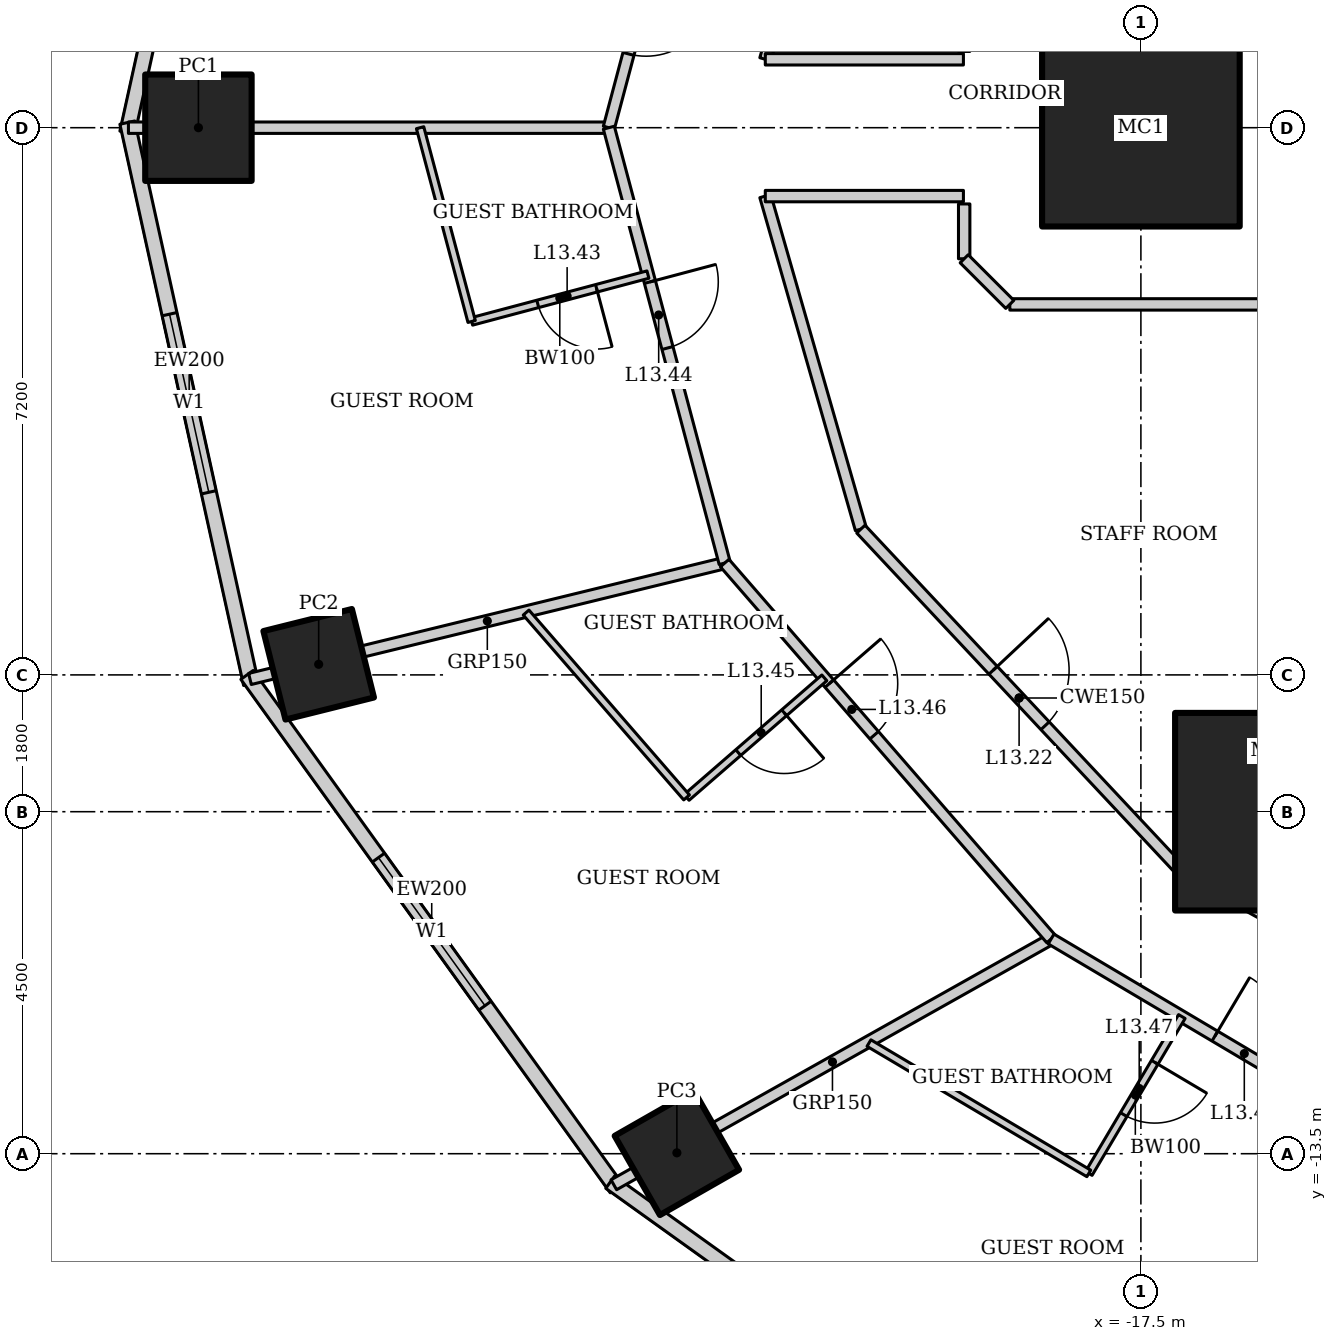
"""IFC4 building model, lengths in metres.
Left out: names, types, materials, properties, quantities, classifications, styles, units other than length and angle.
Written with IfcOpenShell. Run it as: python <this file> out.ifc"""

import sys

from ifc_helpers import new_model, si_unit, direction, frame, frame_2d, origin, origin_2d, place, context, subcontext, project, spatial, rectangle, hollow_rectangle, extrude, element, fill, save


model = new_model("IFC4")
c1 = context("Model", 3, precision=1e-05, world=origin(), true_north=direction((0.0, 1.0)))
c2 = subcontext(c1, "Body", "Model", "MODEL_VIEW")
j1 = project(units=[si_unit("LENGTHUNIT", "METRE"), si_unit("PLANEANGLEUNIT", "RADIAN")], contexts=[c1])
p1 = place(None, origin())
s1 = spatial("IfcSite", under=j1, at=p1, CompositionType="ELEMENT")
p2 = place(p1, origin())
s2 = spatial("IfcBuilding", under=s1, at=p2, CompositionType="ELEMENT")
p3 = place(p2, frame((0.0, 0.0, 62.2)))
s3 = spatial("IfcBuildingStorey", under=s2, at=p3, CompositionType="ELEMENT", Elevation=62.2)
for number, where, z_axis, x_axis in (
    (1, (-17.5, 0.0, 0.0), (0.0, 0.0, 1.0), (1.0, 0.0, 0.0)),
    (2, (-15.75, -9.0, 0.0), (0.0, 0.0, 1.0), (1.0, 0.0, 0.0)),
):
    element("IfcColumn", number, at=place(p3, frame(where, z_axis=z_axis, x_axis=x_axis)), inside=s3, PredefinedType="COLUMN", context=c2, shape_type="SweptSolid", body=[
        extrude(hollow_rectangle(XDim=2.6, YDim=2.6, WallThickness=0.13, at=origin_2d()), origin(), (0.0, 0.0, 1.0), 3.6),
    ])
p4 = place(p3, frame((-29.9, 0.0, 0.0), z_axis=(0.0, 0.0, 1.0), x_axis=(1.0, 0.0, 0.0)))
e3 = element("IfcColumn", 3, at=p4, inside=s3, PredefinedType="COLUMN", context=c2, shape_type="SweptSolid", body=[
    extrude(hollow_rectangle(XDim=1.4, YDim=1.4, WallThickness=0.1, at=origin_2d()), origin(), (0.0, 0.0, 1.0), 3.6),
])
p5 = place(p3, frame((-28.318, -7.06, 0.0), z_axis=(0.0, 0.0, 1.0), x_axis=(0.970295726276, 0.2419218956, 0.0)))
e4 = element("IfcColumn", 4, at=p5, inside=s3, PredefinedType="COLUMN", context=c2, shape_type="SweptSolid", body=[
    extrude(hollow_rectangle(XDim=1.2, YDim=1.2, WallThickness=0.1, at=origin_2d()), origin(), (0.0, 0.0, 1.0), 3.6),
])
p6 = place(p3, frame((-23.605, -13.489, 0.0), z_axis=(0.0, 0.0, 1.0), x_axis=(0.86824298017, 0.496139221777, 0.0)))
e5 = element("IfcColumn", 5, at=p6, inside=s3, PredefinedType="COLUMN", context=c2, shape_type="SweptSolid", body=[
    extrude(hollow_rectangle(XDim=1.2, YDim=1.2, WallThickness=0.12, at=origin_2d()), origin(), (0.0, 0.0, 1.0), 3.6),
])
p7 = place(p3, frame((-29.208, 7.318, 0.0), z_axis=(0.0, 0.0, 1.0), x_axis=(-0.215238065514, -0.976561608478, 0.0)))
e6 = element("IfcWall", 6, at=p7, inside=s3, PredefinedType="SOLIDWALL", context=c2, shape_type="SweptSolid", body=[
    extrude(rectangle(XDim=7.562, YDim=0.2, at=frame_2d((3.781, 0.0))), origin(), (0.0, 0.0, 1.0), 3.45),
])
p8 = place(p7, frame((2.581, 0.0, 0.5)))
e7 = element("IfcOpeningElement", 7, at=p8, cuts=e6, PredefinedType="OPENING", context=c2, shape_type="SweptSolid", body=[
    extrude(rectangle(XDim=2.4, YDim=2.2, at=frame_2d((1.2, 1.1))), frame((0.0, 0.11, 0.0), z_axis=(0.0, -1.0, 0.0), x_axis=(1.0, 0.0, 0.0)), (0.0, 0.0, 1.0), 0.22),
])
p9 = place(p3, frame((-30.835, 0.067, 0.0), z_axis=(0.0, 0.0, 1.0), x_axis=(0.215238065514, -0.976561608478, 0.0)))
e8 = element("IfcWall", 8, at=p9, inside=s3, PredefinedType="SOLIDWALL", context=c2, shape_type="SweptSolid", body=[
    extrude(rectangle(XDim=7.562, YDim=0.2, at=frame_2d((3.781, 0.0))), origin(), (0.0, 0.0, 1.0), 3.45),
])
p10 = place(p9, frame((2.581, 0.0, 0.5)))
e9 = element("IfcOpeningElement", 9, at=p10, cuts=e8, PredefinedType="OPENING", context=c2, shape_type="SweptSolid", body=[
    extrude(rectangle(XDim=2.4, YDim=2.2, at=frame_2d((1.2, 1.1))), frame((0.0, 0.11, 0.0), z_axis=(0.0, -1.0, 0.0), x_axis=(1.0, 0.0, 0.0)), (0.0, 0.0, 1.0), 0.22),
])
p11 = place(p3, frame((-29.26, -7.2, 0.0), z_axis=(0.0, 0.0, 1.0), x_axis=(0.583937613703, -0.811798536155, 0.0)))
e10 = element("IfcWall", 10, at=p11, inside=s3, PredefinedType="SOLIDWALL", context=c2, shape_type="SweptSolid", body=[
    extrude(rectangle(XDim=8.323, YDim=0.2, at=frame_2d((4.162, 0.0))), origin(), (0.0, 0.0, 1.0), 3.45),
])
p12 = place(p11, frame((2.961, 0.0, 0.5)))
e11 = element("IfcOpeningElement", 11, at=p12, cuts=e10, PredefinedType="OPENING", context=c2, shape_type="SweptSolid", body=[
    extrude(rectangle(XDim=2.4, YDim=2.2, at=frame_2d((1.2, 1.1))), frame((0.0, 0.11, 0.0), z_axis=(0.0, -1.0, 0.0), x_axis=(1.0, 0.0, 0.0)), (0.0, 0.0, 1.0), 0.22),
])
p13 = place(p3, frame((-24.482, -13.875, 0.0), z_axis=(0.0, 0.0, 1.0), x_axis=(0.812791321576, -0.582554948112, 0.0)))
e12 = element("IfcWall", 12, at=p13, inside=s3, PredefinedType="SOLIDWALL", context=c2, shape_type="SweptSolid", body=[
    extrude(rectangle(XDim=8.063, YDim=0.2, at=frame_2d((4.032, 0.0))), origin(), (0.0, 0.0, 1.0), 3.45),
])
p14 = place(p13, frame((2.832, 0.0, 0.5)))
e13 = element("IfcOpeningElement", 13, at=p14, cuts=e12, PredefinedType="OPENING", context=c2, shape_type="SweptSolid", body=[
    extrude(rectangle(XDim=2.4, YDim=2.2, at=frame_2d((1.2, 1.1))), frame((0.0, 0.11, 0.0), z_axis=(0.0, -1.0, 0.0), x_axis=(1.0, 0.0, 0.0)), (0.0, 0.0, 1.0), 0.22),
])
p15 = place(p3, frame((-30.821, 0.0, 0.0), z_axis=(0.0, 0.0, 1.0), x_axis=(1.0, 0.0, 0.0)))
e14 = element("IfcWall", 14, at=p15, inside=s3, PredefinedType="PARTITIONING", context=c2, shape_type="SweptSolid", body=[
    extrude(rectangle(XDim=6.321, YDim=0.15, at=frame_2d((3.16, 0.0))), origin(), (0.0, 0.0, 1.0), 2.528),
])
p16 = place(p3, frame((-29.222, -7.254, 0.0), z_axis=(0.0, 0.0, 1.0), x_axis=(0.971456980633, 0.237215797913, 0.0)))
e15 = element("IfcWall", 15, at=p16, inside=s3, PredefinedType="PARTITIONING", context=c2, shape_type="SweptSolid", body=[
    extrude(rectangle(XDim=6.429, YDim=0.15, at=frame_2d((3.215, 0.0))), origin(), (0.0, 0.0, 1.0), 2.333),
])
p17 = place(p3, frame((-24.435, -13.909, 0.0), z_axis=(0.0, 0.0, 1.0), x_axis=(0.871747379892, 0.489955616001, 0.0)))
e16 = element("IfcWall", 16, at=p17, inside=s3, PredefinedType="PARTITIONING", context=c2, shape_type="SweptSolid", body=[
    extrude(rectangle(XDim=6.6, YDim=0.15, at=frame_2d((3.3, 0.0))), origin(), (0.0, 0.0, 1.0), 2.693),
])
p18 = place(p3, frame((-17.97, -18.542, 0.0), z_axis=(0.0, 0.0, 1.0), x_axis=(0.699736251994, 0.714401272147, 0.0)))
e17 = element("IfcWall", 17, at=p18, inside=s3, PredefinedType="PARTITIONING", context=c2, shape_type="SweptSolid", body=[
    extrude(rectangle(XDim=6.593, YDim=0.15, at=frame_2d((3.296, 0.0))), origin(), (0.0, 0.0, 1.0), 2.528),
])
p19 = place(p3, frame((-22.976, 5.729, 0.0), z_axis=(0.0, 0.0, 1.0), x_axis=(-0.257083265334, -0.966389256296, 0.0)))
e18 = element("IfcWall", 18, at=p19, inside=s3, PredefinedType="PARTITIONING", context=c2, shape_type="SweptSolid", body=[
    extrude(rectangle(XDim=5.928, YDim=0.15, at=frame_2d((2.964, 0.0))), origin(), (0.0, 0.0, 1.0), 3.45),
])
p20 = place(p19, frame((4.023, 0.0, 0.0)))
e19 = element("IfcOpeningElement", 19, at=p20, cuts=e18, PredefinedType="OPENING", context=c2, shape_type="SweptSolid", body=[
    extrude(rectangle(XDim=0.9, YDim=2.1, at=frame_2d((0.45, 1.05))), frame((0.0, 0.085, 0.0), z_axis=(0.0, -1.0, 0.0), x_axis=(1.0, 0.0, 0.0)), (0.0, 0.0, 1.0), 0.17),
])
p21 = place(p3, frame((-24.5, 0.0, 0.0), z_axis=(0.0, 0.0, 1.0), x_axis=(0.257083265334, -0.966389256296, 0.0)))
e20 = element("IfcWall", 20, at=p21, inside=s3, PredefinedType="PARTITIONING", context=c2, shape_type="SweptSolid", body=[
    extrude(rectangle(XDim=5.928, YDim=0.15, at=frame_2d((2.964, 0.0))), origin(), (0.0, 0.0, 1.0), 3.45),
])
p22 = place(p21, frame((2.1, 0.0, 0.0)))
e21 = element("IfcOpeningElement", 21, at=p22, cuts=e20, PredefinedType="OPENING", context=c2, shape_type="SweptSolid", body=[
    extrude(rectangle(XDim=0.9, YDim=2.1, at=frame_2d((0.45, 1.05))), frame((0.0, 0.085, 0.0), z_axis=(0.0, -1.0, 0.0), x_axis=(1.0, 0.0, 0.0)), (0.0, 0.0, 1.0), 0.17),
])
p23 = place(p3, frame((-22.976, -5.729, 0.0), z_axis=(0.0, 0.0, 1.0), x_axis=(0.655599989166, -0.755108372491, 0.0)))
e22 = element("IfcWall", 22, at=p23, inside=s3, PredefinedType="PARTITIONING", context=c2, shape_type="SweptSolid", body=[
    extrude(rectangle(XDim=6.551, YDim=0.15, at=frame_2d((3.275, 0.0))), origin(), (0.0, 0.0, 1.0), 3.45),
])
p24 = place(p23, frame((2.1, 0.0, 0.0)))
e23 = element("IfcOpeningElement", 23, at=p24, cuts=e22, PredefinedType="OPENING", context=c2, shape_type="SweptSolid", body=[
    extrude(rectangle(XDim=0.9, YDim=2.1, at=frame_2d((0.45, 1.05))), frame((0.0, 0.085, 0.0), z_axis=(0.0, -1.0, 0.0), x_axis=(1.0, 0.0, 0.0)), (0.0, 0.0, 1.0), 0.17),
])
p25 = place(p3, frame((-18.681, -10.675, 0.0), z_axis=(0.0, 0.0, 1.0), x_axis=(0.860147339762, -0.510045639036, 0.0)))
e24 = element("IfcWall", 24, at=p25, inside=s3, PredefinedType="PARTITIONING", context=c2, shape_type="SweptSolid", body=[
    extrude(rectangle(XDim=6.19, YDim=0.15, at=frame_2d((3.095, 0.0))), origin(), (0.0, 0.0, 1.0), 3.45),
])
p26 = place(p25, frame((2.505, 0.0, 0.0)))
e25 = element("IfcOpeningElement", 25, at=p26, cuts=e24, PredefinedType="OPENING", context=c2, shape_type="SweptSolid", body=[
    extrude(rectangle(XDim=0.9, YDim=2.1, at=frame_2d((0.45, 1.05))), frame((0.0, 0.085, 0.0), z_axis=(0.0, -1.0, 0.0), x_axis=(1.0, 0.0, 0.0)), (0.0, 0.0, 1.0), 0.17),
])
for number, where, z_axis, x_axis in (
    (26, (-21.184, 5.282, 0.0), (0.0, 0.0, 1.0), (-0.276, -0.961, 0.0)),
    (27, (-22.442, -0.9, 0.0), (0.0, 0.0, 1.0), (0.276, -0.961, 0.0)),
):
    element("IfcWall", number, at=place(p3, frame(where, z_axis=z_axis, x_axis=x_axis)), inside=s3, PredefinedType="PARTITIONING", context=c2, shape_type="SweptSolid", body=[
        extrude(rectangle(XDim=4.559, YDim=0.15, at=frame_2d((2.279, 0.0))), origin(), (0.0, 0.0, 1.0), 3.45),
    ])
p27 = place(p3, frame((-21.184, -5.282, 0.0), z_axis=(0.0, 0.0, 1.0), x_axis=(0.68365836236, -0.729802194828, 0.0)))
e28 = element("IfcWall", 28, at=p27, inside=s3, PredefinedType="PARTITIONING", context=c2, shape_type="SweptSolid", body=[
    extrude(rectangle(XDim=6.09, YDim=0.15, at=frame_2d((3.045, 0.0))), origin(), (0.0, 0.0, 1.0), 3.45),
])
p28 = place(p27, frame((2.545, 0.0, 0.0)))
e29 = element("IfcOpeningElement", 29, at=p28, cuts=e28, PredefinedType="OPENING", context=c2, shape_type="SweptSolid", body=[
    extrude(rectangle(XDim=1.0, YDim=2.1, at=frame_2d((0.5, 1.05))), frame((0.0, 0.085, 0.0), z_axis=(0.0, -1.0, 0.0), x_axis=(1.0, 0.0, 0.0)), (0.0, 0.0, 1.0), 0.17),
])
p29 = place(p3, frame((-17.021, -9.726, 0.0), z_axis=(0.0, 0.0, 1.0), x_axis=(0.876522084062, -0.481361647986, 0.0)))
e30 = element("IfcWall", 30, at=p29, inside=s3, PredefinedType="PARTITIONING", context=c2, shape_type="SweptSolid", body=[
    extrude(rectangle(XDim=5.687, YDim=0.15, at=frame_2d((2.844, 0.0))), origin(), (0.0, 0.0, 1.0), 3.45),
])
p30 = place(p3, frame((-23.986, -1.933, 0.0), z_axis=(0.0, 0.0, 1.0), x_axis=(-0.96639514992, -0.257061109879, 0.0)))
e31 = element("IfcWall", 31, at=p30, inside=s3, PredefinedType="PARTITIONING", context=c2, shape_type="SweptSolid", body=[
    extrude(rectangle(XDim=2.4, YDim=0.1, at=frame_2d((1.2, 0.0))), origin(), (0.0, 0.0, 1.0), 3.45),
])
p31 = place(p30, frame((0.7, 0.0, 0.0)))
e32 = element("IfcOpeningElement", 32, at=p31, cuts=e31, PredefinedType="OPENING", context=c2, shape_type="SweptSolid", body=[
    extrude(rectangle(XDim=0.8, YDim=2.1, at=frame_2d((0.4, 1.05))), frame((0.0, 0.06, 0.0), z_axis=(0.0, -1.0, 0.0), x_axis=(1.0, 0.0, 0.0)), (0.0, 0.0, 1.0), 0.12),
])
p32 = place(p3, frame((-26.305, -2.55, 0.0), z_axis=(0.0, 0.0, 1.0), x_axis=(-0.257052122515, 0.966397540513, 0.0)))
e33 = element("IfcWall", 33, at=p32, inside=s3, PredefinedType="PARTITIONING", context=c2, shape_type="SweptSolid", body=[
    extrude(rectangle(XDim=2.638, YDim=0.1, at=frame_2d((1.319, 0.0))), origin(), (0.0, 0.0, 1.0), 3.45),
])
p33 = place(p3, frame((-21.665, -7.239, 0.0), z_axis=(0.0, 0.0, 1.0), x_axis=(-0.755098052661, -0.655611875172, 0.0)))
e34 = element("IfcWall", 34, at=p33, inside=s3, PredefinedType="PARTITIONING", context=c2, shape_type="SweptSolid", body=[
    extrude(rectangle(XDim=2.4, YDim=0.1, at=frame_2d((1.2, 0.0))), origin(), (0.0, 0.0, 1.0), 3.45),
])
p34 = place(p33, frame((0.7, 0.0, 0.0)))
e35 = element("IfcOpeningElement", 35, at=p34, cuts=e34, PredefinedType="OPENING", context=c2, shape_type="SweptSolid", body=[
    extrude(rectangle(XDim=0.8, YDim=2.1, at=frame_2d((0.4, 1.05))), frame((0.0, 0.06, 0.0), z_axis=(0.0, -1.0, 0.0), x_axis=(1.0, 0.0, 0.0)), (0.0, 0.0, 1.0), 0.12),
])
p35 = place(p3, frame((-23.477, -8.812, 0.0), z_axis=(0.0, 0.0, 1.0), x_axis=(-0.655596826012, 0.755111118792, 0.0)))
e36 = element("IfcWall", 36, at=p35, inside=s3, PredefinedType="PARTITIONING", context=c2, shape_type="SweptSolid", body=[
    extrude(rectangle(XDim=3.221, YDim=0.1, at=frame_2d((1.611, 0.0))), origin(), (0.0, 0.0, 1.0), 3.45),
])
p36 = place(p3, frame((-16.961, -11.695, 0.0), z_axis=(0.0, 0.0, 1.0), x_axis=(-0.510075642074, -0.860129548012, 0.0)))
e37 = element("IfcWall", 37, at=p36, inside=s3, PredefinedType="PARTITIONING", context=c2, shape_type="SweptSolid", body=[
    extrude(rectangle(XDim=2.4, YDim=0.1, at=frame_2d((1.2, 0.0))), origin(), (0.0, 0.0, 1.0), 3.45),
])
p37 = place(p36, frame((0.7, 0.0, 0.0)))
e38 = element("IfcOpeningElement", 38, at=p37, cuts=e37, PredefinedType="OPENING", context=c2, shape_type="SweptSolid", body=[
    extrude(rectangle(XDim=0.8, YDim=2.1, at=frame_2d((0.4, 1.05))), frame((0.0, 0.06, 0.0), z_axis=(0.0, -1.0, 0.0), x_axis=(1.0, 0.0, 0.0)), (0.0, 0.0, 1.0), 0.12),
])
p38 = place(p3, frame((-18.185, -13.76, 0.0), z_axis=(0.0, 0.0, 1.0), x_axis=(-0.860146437071, 0.510047161343, 0.0)))
e39 = element("IfcWall", 39, at=p38, inside=s3, PredefinedType="PARTITIONING", context=c2, shape_type="SweptSolid", body=[
    extrude(rectangle(XDim=3.363, YDim=0.1, at=frame_2d((1.681, 0.0))), origin(), (0.0, 0.0, 1.0), 3.45),
])
for number, where, z_axis, x_axis in (
    (40, (-19.835, -0.9, 0.0), (0.0, 0.0, 1.0), (-1.0, 0.0, 0.0)),
    (41, (-19.835, 0.9, 0.0), (0.0, 0.0, 1.0), (-1.0, 0.0, 0.0)),
):
    element("IfcWall", number, at=place(p3, frame(where, z_axis=z_axis, x_axis=x_axis)), inside=s3, PredefinedType="PARTITIONING", context=c2, shape_type="SweptSolid", body=[
        extrude(rectangle(XDim=2.607, YDim=0.15, at=frame_2d((1.303, 0.0))), origin(), (0.0, 0.0, 1.0), 3.45),
    ])
p39 = place(p3, frame((-19.825, -1.725, 0.0), z_axis=(0.0, 0.0, 1.0), x_axis=(0.0, 1.0, 0.0)))
e42 = element("IfcWall", 42, at=p39, inside=s3, PredefinedType="PARTITIONING", context=c2, shape_type="SweptSolid", body=[
    extrude(rectangle(XDim=0.721, YDim=0.15, at=frame_2d((0.361, 0.0))), origin(), (0.0, 0.0, 1.0), 3.45),
])
p40 = place(p3, frame((-15.775, -2.325, 0.0), z_axis=(0.0, 0.0, 1.0), x_axis=(-1.0, 0.0, 0.0)))
e43 = element("IfcWall", 43, at=p40, inside=s3, PredefinedType="PARTITIONING", context=c2, shape_type="SweptSolid", body=[
    extrude(rectangle(XDim=3.449, YDim=0.15, at=frame_2d((1.725, 0.0))), origin(), (0.0, 0.0, 1.0), 3.45),
])
p41 = place(p3, frame((-19.225, -2.325, 0.0), z_axis=(0.0, 0.0, 1.0), x_axis=(-0.707106781187, 0.707106781187, 0.0)))
e44 = element("IfcWall", 44, at=p41, inside=s3, PredefinedType="PARTITIONING", context=c2, shape_type="SweptSolid", body=[
    extrude(rectangle(XDim=0.849, YDim=0.15, at=frame_2d((0.425, 0.0))), origin(), (0.0, 0.0, 1.0), 3.45),
])
p42 = place(p10, origin())
e45 = element("IfcWindow", 45, at=p42, inside=s3, PartitioningType="SINGLE_PANEL", PredefinedType="WINDOW", context=c2, shape_type="SweptSolid", body=[
    extrude(rectangle(XDim=2.4, YDim=2.2, at=frame_2d((1.2, 1.1))), frame((0.0, 0.03, 0.0), z_axis=(0.0, -1.0, 0.0), x_axis=(1.0, 0.0, 0.0)), (0.0, 0.0, 1.0), 0.06),
])
fill(e9, e45)
p43 = place(p12, origin())
e46 = element("IfcWindow", 46, at=p43, inside=s3, PartitioningType="SINGLE_PANEL", PredefinedType="WINDOW", context=c2, shape_type="SweptSolid", body=[
    extrude(rectangle(XDim=2.4, YDim=2.2, at=frame_2d((1.2, 1.1))), frame((0.0, 0.03, 0.0), z_axis=(0.0, -1.0, 0.0), x_axis=(1.0, 0.0, 0.0)), (0.0, 0.0, 1.0), 0.06),
])
fill(e11, e46)
p44 = place(p28, origin())
e47 = element("IfcDoor", 47, at=p44, inside=s3, OperationType="SINGLE_SWING_LEFT", PredefinedType="DOOR", context=c2, shape_type="SweptSolid", body=[
    extrude(rectangle(XDim=1.0, YDim=2.1, at=frame_2d((0.5, 1.05))), frame((0.0, 0.025, 0.0), z_axis=(0.0, -1.0, 0.0), x_axis=(1.0, 0.0, 0.0)), (0.0, 0.0, 1.0), 0.05),
])
fill(e29, e47)
p45 = place(p20, origin())
e48 = element("IfcDoor", 48, at=p45, inside=s3, OperationType="SINGLE_SWING_LEFT", PredefinedType="DOOR", context=c2, shape_type="SweptSolid", body=[
    extrude(rectangle(XDim=0.9, YDim=2.1, at=frame_2d((0.45, 1.05))), frame((0.0, 0.025, 0.0), z_axis=(0.0, -1.0, 0.0), x_axis=(1.0, 0.0, 0.0)), (0.0, 0.0, 1.0), 0.05),
])
fill(e19, e48)
p46 = place(p31, origin())
e49 = element("IfcDoor", 49, at=p46, inside=s3, OperationType="SINGLE_SWING_LEFT", PredefinedType="DOOR", context=c2, shape_type="SweptSolid", body=[
    extrude(rectangle(XDim=0.8, YDim=2.1, at=frame_2d((0.4, 1.05))), frame((0.0, 0.025, 0.0), z_axis=(0.0, -1.0, 0.0), x_axis=(1.0, 0.0, 0.0)), (0.0, 0.0, 1.0), 0.05),
])
fill(e32, e49)
p47 = place(p22, origin())
e50 = element("IfcDoor", 50, at=p47, inside=s3, OperationType="SINGLE_SWING_LEFT", PredefinedType="DOOR", context=c2, shape_type="SweptSolid", body=[
    extrude(rectangle(XDim=0.9, YDim=2.1, at=frame_2d((0.45, 1.05))), frame((0.0, 0.025, 0.0), z_axis=(0.0, -1.0, 0.0), x_axis=(1.0, 0.0, 0.0)), (0.0, 0.0, 1.0), 0.05),
])
fill(e21, e50)
p48 = place(p34, origin())
e51 = element("IfcDoor", 51, at=p48, inside=s3, OperationType="SINGLE_SWING_LEFT", PredefinedType="DOOR", context=c2, shape_type="SweptSolid", body=[
    extrude(rectangle(XDim=0.8, YDim=2.1, at=frame_2d((0.4, 1.05))), frame((0.0, 0.025, 0.0), z_axis=(0.0, -1.0, 0.0), x_axis=(1.0, 0.0, 0.0)), (0.0, 0.0, 1.0), 0.05),
])
fill(e35, e51)
p49 = place(p24, origin())
e52 = element("IfcDoor", 52, at=p49, inside=s3, OperationType="SINGLE_SWING_LEFT", PredefinedType="DOOR", context=c2, shape_type="SweptSolid", body=[
    extrude(rectangle(XDim=0.9, YDim=2.1, at=frame_2d((0.45, 1.05))), frame((0.0, 0.025, 0.0), z_axis=(0.0, -1.0, 0.0), x_axis=(1.0, 0.0, 0.0)), (0.0, 0.0, 1.0), 0.05),
])
fill(e23, e52)
p50 = place(p37, origin())
e53 = element("IfcDoor", 53, at=p50, inside=s3, OperationType="SINGLE_SWING_LEFT", PredefinedType="DOOR", context=c2, shape_type="SweptSolid", body=[
    extrude(rectangle(XDim=0.8, YDim=2.1, at=frame_2d((0.4, 1.05))), frame((0.0, 0.025, 0.0), z_axis=(0.0, -1.0, 0.0), x_axis=(1.0, 0.0, 0.0)), (0.0, 0.0, 1.0), 0.05),
])
fill(e38, e53)
p51 = place(p26, origin())
e54 = element("IfcDoor", 54, at=p51, inside=s3, OperationType="SINGLE_SWING_LEFT", PredefinedType="DOOR", context=c2, shape_type="SweptSolid", body=[
    extrude(rectangle(XDim=0.9, YDim=2.1, at=frame_2d((0.45, 1.05))), frame((0.0, 0.025, 0.0), z_axis=(0.0, -1.0, 0.0), x_axis=(1.0, 0.0, 0.0)), (0.0, 0.0, 1.0), 0.05),
])
fill(e25, e54)
save(model, sys.argv[1])
